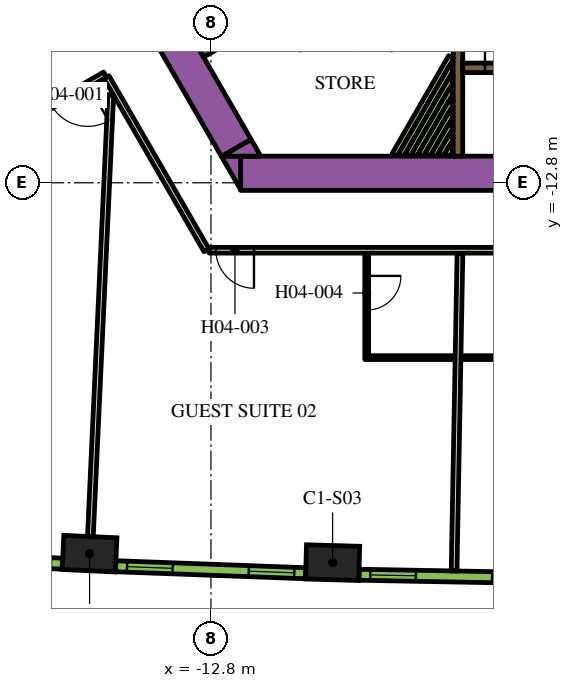
"""IFC4 building model, lengths in metres.
Left out: names, types, materials, properties, quantities, classifications, styles, units other than length and angle.
Written with IfcOpenShell. Run it as: python <this file> out.ifc"""

import sys

from ifc_helpers import new_model, si_unit, direction, frame, frame_2d, origin, origin_2d, place, context, subcontext, project, spatial, polyline, rectangle, outline, extrude, element, fill, save


model = new_model("IFC4")
c1 = context("Model", 3, precision=1e-05, world=origin(), true_north=direction((0.0, 1.0)))
c2 = subcontext(c1, "Body", "Model", "MODEL_VIEW")
j1 = project(units=[si_unit("LENGTHUNIT", "METRE"), si_unit("PLANEANGLEUNIT", "RADIAN")], contexts=[c1])
p1 = place(None, origin())
s1 = spatial("IfcSite", under=j1, at=p1, CompositionType="ELEMENT")
p2 = place(p1, origin())
s2 = spatial("IfcBuilding", under=s1, at=p2, CompositionType="ELEMENT")
p3 = place(p2, frame((0.0, 0.0, 70.5)))
s3 = spatial("IfcBuildingStorey", under=s2, at=p3, CompositionType="ELEMENT", Elevation=70.5)
for number, where, z_axis, x_axis in (
    (1, (-15.994, -22.558, 0.0), (0.0, 0.0, 1.0), (0.999, -0.046, 0.0)),
    (2, (-9.599, -22.795, 0.0), (0.0, 0.0, 1.0), (1.0, -0.028, 0.0)),
):
    element("IfcColumn", number, at=place(p3, frame(where, z_axis=z_axis, x_axis=x_axis)), inside=s3, PredefinedType="COLUMN", context=c2, shape_type="SweptSolid", body=[
        extrude(rectangle(XDim=1.4, YDim=0.9, at=origin_2d()), origin(), (0.0, 0.0, 1.0), 3.9),
    ])
p4 = place(p3, frame((-12.019, -12.55, 0.0), z_axis=(0.0, 0.0, 1.0), x_axis=(1.0, 0.0, 0.0)))
e3 = element("IfcWall", 3, at=p4, inside=s3, PredefinedType="SOLIDWALL", context=c2, shape_type="SweptSolid", body=[
    extrude(rectangle(XDim=21.63, YDim=0.9, at=frame_2d((10.815, 0.0))), origin(), (0.0, 0.0, 1.0), 3.9),
])
p5 = place(p3, origin())
e4 = element("IfcWall", 4, at=p5, inside=s3, PredefinedType="SOLIDWALL", context=c2, shape_type="SweptSolid", body=[
    extrude(outline(polyline([(-12.529, -12.1), (-12.021, -12.1), (-12.021, -12.98), (-12.529, -12.1)])), origin(), (0.0, 0.0, 1.0), 3.9),
])
p6 = place(p3, frame((-12.134, -11.883, 0.0), z_axis=(0.0, 0.0, 1.0), x_axis=(-0.500005339912, 0.866022320763, 0.0)))
e5 = element("IfcWall", 5, at=p6, inside=s3, PredefinedType="SOLIDWALL", context=c2, shape_type="SweptSolid", body=[
    extrude(rectangle(XDim=9.488, YDim=0.9, at=frame_2d((4.744, 0.0))), origin(), (0.0, 0.0, 1.0), 3.9),
])
e6 = element("IfcWall", 6, at=p5, inside=s3, PredefinedType="SOLIDWALL", context=c2, shape_type="SweptSolid", body=[
    extrude(outline(polyline([(-11.489, -12.1), (-12.505, -12.1), (-11.743, -11.66), (-11.489, -12.1)])), origin(), (0.0, 0.0, 1.0), 3.9),
])
p7 = place(p3, frame((-12.885, -9.431, 0.0), z_axis=(0.0, 0.0, 1.0), x_axis=(-0.500020560727, 0.866013532718, 0.0)))
e7 = element("IfcWall", 7, at=p7, inside=s3, PredefinedType="SOLIDWALL", context=c2, shape_type="SweptSolid", body=[
    extrude(rectangle(XDim=3.45, YDim=0.25, at=frame_2d((1.725, 0.0))), origin(), (0.0, 0.0, 1.0), 3.9),
])
p8 = place(p3, frame((-12.84, -9.261, 0.0), z_axis=(0.0, 0.0, 1.0), x_axis=(0.866016039709, 0.500016218704, 0.0)))
e8 = element("IfcWall", 8, at=p8, inside=s3, PredefinedType="SOLIDWALL", context=c2, shape_type="SweptSolid", body=[
    extrude(rectangle(XDim=7.05, YDim=0.25, at=frame_2d((3.525, 0.0))), origin(), (0.0, 0.0, 1.0), 3.9),
])
p9 = place(p3, frame((-6.3, -12.1, 0.0), z_axis=(0.0, 0.0, 1.0), x_axis=(0.0, 1.0, 0.0)))
e9 = element("IfcWall", 9, at=p9, inside=s3, PredefinedType="SOLIDWALL", context=c2, shape_type="SweptSolid", body=[
    extrude(rectangle(XDim=3.265, YDim=0.25, at=frame_2d((1.632, 0.0))), origin(), (0.0, 0.0, 1.0), 3.9),
])
p10 = place(p3, frame((-7.968, -12.068, 0.0), z_axis=(0.0, 0.0, 1.0), x_axis=(0.500013701029, 0.866017493347, 0.0)))
e10 = element("IfcWall", 10, at=p10, inside=s3, PredefinedType="PARTITIONING", context=c2, shape_type="SweptSolid", body=[
    extrude(rectangle(XDim=2.975, YDim=0.15, at=frame_2d((1.488, 0.0))), origin(), (0.0, 0.0, 1.0), 2.75),
])
p11 = place(p3, frame((-7.794, -12.068, 0.0), z_axis=(0.0, 0.0, 1.0), x_axis=(0.499985098601, 0.86603400694, 0.0)))
e11 = element("IfcWall", 11, at=p11, inside=s3, PredefinedType="PARTITIONING", context=c2, shape_type="SweptSolid", body=[
    extrude(rectangle(XDim=2.628, YDim=0.15, at=frame_2d((1.314, 0.0))), origin(), (0.0, 0.0, 1.0), 2.75),
])
p12 = place(p3, frame((-7.621, -12.068, 0.0), z_axis=(0.0, 0.0, 1.0), x_axis=(0.500028047758, 0.866009209798, 0.0)))
e12 = element("IfcWall", 12, at=p12, inside=s3, PredefinedType="PARTITIONING", context=c2, shape_type="SweptSolid", body=[
    extrude(rectangle(XDim=2.282, YDim=0.15, at=frame_2d((1.141, 0.0))), origin(), (0.0, 0.0, 1.0), 2.75),
])
p13 = place(p3, frame((-7.448, -12.068, 0.0), z_axis=(0.0, 0.0, 1.0), x_axis=(0.500031751504, 0.866007071269, 0.0)))
e13 = element("IfcWall", 13, at=p13, inside=s3, PredefinedType="PARTITIONING", context=c2, shape_type="SweptSolid", body=[
    extrude(rectangle(XDim=1.936, YDim=0.15, at=frame_2d((0.968, 0.0))), origin(), (0.0, 0.0, 1.0), 2.75),
])
p14 = place(p3, frame((-7.275, -12.068, 0.0), z_axis=(0.0, 0.0, 1.0), x_axis=(0.499988385283, 0.86603210944, 0.0)))
e14 = element("IfcWall", 14, at=p14, inside=s3, PredefinedType="PARTITIONING", context=c2, shape_type="SweptSolid", body=[
    extrude(rectangle(XDim=1.589, YDim=0.15, at=frame_2d((0.795, 0.0))), origin(), (0.0, 0.0, 1.0), 2.75),
])
p15 = place(p3, frame((-7.102, -12.068, 0.0), z_axis=(0.0, 0.0, 1.0), x_axis=(0.500068153333, 0.865986051864, 0.0)))
e15 = element("IfcWall", 15, at=p15, inside=s3, PredefinedType="PARTITIONING", context=c2, shape_type="SweptSolid", body=[
    extrude(rectangle(XDim=1.243, YDim=0.15, at=frame_2d((0.622, 0.0))), origin(), (0.0, 0.0, 1.0), 2.75),
])
p16 = place(p3, frame((-6.928, -12.068, 0.0), z_axis=(0.0, 0.0, 1.0), x_axis=(0.500005339912, 0.866022320763, 0.0)))
e16 = element("IfcWall", 16, at=p16, inside=s3, PredefinedType="PARTITIONING", context=c2, shape_type="SweptSolid", body=[
    extrude(rectangle(XDim=0.896, YDim=0.15, at=frame_2d((0.448, 0.0))), origin(), (0.0, 0.0, 1.0), 2.75),
])
p17 = place(p3, frame((-6.755, -12.068, 0.0), z_axis=(0.0, 0.0, 1.0), x_axis=(0.500196256984, 0.865912065108, 0.0)))
e17 = element("IfcWall", 17, at=p17, inside=s3, PredefinedType="PARTITIONING", context=c2, shape_type="SweptSolid", body=[
    extrude(rectangle(XDim=0.55, YDim=0.15, at=frame_2d((0.275, 0.0))), origin(), (0.0, 0.0, 1.0), 2.75),
])
p18 = place(p3, frame((-6.582, -12.068, 0.0), z_axis=(0.0, 0.0, 1.0), x_axis=(0.499618727529, 0.866245419672, 0.0)))
e18 = element("IfcWall", 18, at=p18, inside=s3, PredefinedType="PARTITIONING", context=c2, shape_type="SweptSolid", body=[
    extrude(rectangle(XDim=0.204, YDim=0.15, at=frame_2d((0.102, 0.0))), origin(), (0.0, 0.0, 1.0), 2.75),
])
p19 = place(p3, frame((-6.175, -9.775, 0.0), z_axis=(0.0, 0.0, 1.0), x_axis=(1.0, 0.0, 0.0)))
e19 = element("IfcWall", 19, at=p19, inside=s3, PredefinedType="SOLIDWALL", context=c2, shape_type="SweptSolid", body=[
    extrude(rectangle(XDim=12.35, YDim=0.25, at=frame_2d((6.175, 0.0))), origin(), (0.0, 0.0, 1.0), 3.9),
])
p20 = place(p19, frame((0.585, 0.0, 0.0)))
e20 = element("IfcOpeningElement", 20, at=p20, cuts=e19, PredefinedType="OPENING", context=c2, shape_type="SweptSolid", body=[
    extrude(rectangle(XDim=1.1, YDim=2.1, at=frame_2d((0.55, 1.05))), frame((0.0, 0.135, 0.0), z_axis=(0.0, -1.0, 0.0), x_axis=(1.0, 0.0, 0.0)), (0.0, 0.0, 1.0), 0.27),
])
p21 = place(p19, frame((3.105, 0.0, 0.0)))
e21 = element("IfcOpeningElement", 21, at=p21, cuts=e19, PredefinedType="OPENING", context=c2, shape_type="SweptSolid", body=[
    extrude(rectangle(XDim=1.1, YDim=2.1, at=frame_2d((0.55, 1.05))), frame((0.0, 0.135, 0.0), z_axis=(0.0, -1.0, 0.0), x_axis=(1.0, 0.0, 0.0)), (0.0, 0.0, 1.0), 0.27),
])
p22 = place(p19, frame((5.625, 0.0, 0.0)))
e22 = element("IfcOpeningElement", 22, at=p22, cuts=e19, PredefinedType="OPENING", context=c2, shape_type="SweptSolid", body=[
    extrude(rectangle(XDim=1.1, YDim=2.1, at=frame_2d((0.55, 1.05))), frame((0.0, 0.135, 0.0), z_axis=(0.0, -1.0, 0.0), x_axis=(1.0, 0.0, 0.0)), (0.0, 0.0, 1.0), 0.27),
])
p23 = place(p19, frame((8.145, 0.0, 0.0)))
e23 = element("IfcOpeningElement", 23, at=p23, cuts=e19, PredefinedType="OPENING", context=c2, shape_type="SweptSolid", body=[
    extrude(rectangle(XDim=1.1, YDim=2.1, at=frame_2d((0.55, 1.05))), frame((0.0, 0.135, 0.0), z_axis=(0.0, -1.0, 0.0), x_axis=(1.0, 0.0, 0.0)), (0.0, 0.0, 1.0), 0.27),
])
p24 = place(p19, frame((10.665, 0.0, 0.0)))
e24 = element("IfcOpeningElement", 24, at=p24, cuts=e19, PredefinedType="OPENING", context=c2, shape_type="SweptSolid", body=[
    extrude(rectangle(XDim=1.1, YDim=2.1, at=frame_2d((0.55, 1.05))), frame((0.0, 0.135, 0.0), z_axis=(0.0, -1.0, 0.0), x_axis=(1.0, 0.0, 0.0)), (0.0, 0.0, 1.0), 0.27),
])
p25 = place(p3, frame((-30.463, -16.635, 0.0), z_axis=(0.0, 0.0, 1.0), x_axis=(0.866022394896, 0.500005211512, 0.0)))
e25 = element("IfcWall", 25, at=p25, inside=s3, PredefinedType="PARTITIONING", context=c2, shape_type="SweptSolid", body=[
    extrude(rectangle(XDim=16.144, YDim=0.15, at=frame_2d((8.072, 0.0))), origin(), (0.0, 0.0, 1.0), 2.75),
])
p26 = place(p25, frame((11.004, 0.0, 0.0)))
e26 = element("IfcOpeningElement", 26, at=p26, cuts=e25, PredefinedType="OPENING", context=c2, shape_type="SweptSolid", body=[
    extrude(rectangle(XDim=1.0, YDim=2.1, at=frame_2d((0.5, 1.05))), frame((0.0, 0.085, 0.0), z_axis=(0.0, -1.0, 0.0), x_axis=(1.0, 0.0, 0.0)), (0.0, 0.0, 1.0), 0.17),
])
p27 = place(p3, frame((-15.587, -9.952, 0.0), z_axis=(0.0, 0.0, 1.0), x_axis=(-0.866022197818, -0.500005552856, 0.0)))
e27 = element("IfcWall", 27, at=p27, inside=s3, PredefinedType="PARTITIONING", context=c2, shape_type="SweptSolid", body=[
    extrude(rectangle(XDim=16.224, YDim=0.15, at=frame_2d((8.112, 0.0))), origin(), (0.0, 0.0, 1.0), 2.75),
])
p28 = place(p27, frame((0.527, 0.0, 0.0)))
e28 = element("IfcOpeningElement", 28, at=p28, cuts=e27, PredefinedType="OPENING", context=c2, shape_type="SweptSolid", body=[
    extrude(rectangle(XDim=1.1, YDim=2.1, at=frame_2d((0.55, 1.05))), frame((0.0, 0.085, 0.0), z_axis=(0.0, -1.0, 0.0), x_axis=(1.0, 0.0, 0.0)), (0.0, 0.0, 1.0), 0.17),
])
p29 = place(p3, frame((-12.918, -14.575, 0.0), z_axis=(0.0, 0.0, 1.0), x_axis=(-0.500009150678, 0.866020120573, 0.0)))
e29 = element("IfcWall", 29, at=p29, inside=s3, PredefinedType="PARTITIONING", context=c2, shape_type="SweptSolid", body=[
    extrude(rectangle(XDim=5.258, YDim=0.15, at=frame_2d((2.629, 0.0))), origin(), (0.0, 0.0, 1.0), 2.75),
])
p30 = place(p3, frame((12.918, -14.575, 0.0), z_axis=(0.0, 0.0, 1.0), x_axis=(-1.0, 0.0, 0.0)))
e30 = element("IfcWall", 30, at=p30, inside=s3, PredefinedType="PARTITIONING", context=c2, shape_type="SweptSolid", body=[
    extrude(rectangle(XDim=25.766, YDim=0.15, at=frame_2d((12.883, 0.0))), origin(), (0.0, 0.0, 1.0), 2.75),
])
p31 = place(p30, frame((24.586, 0.0, 0.0)))
e31 = element("IfcOpeningElement", 31, at=p31, cuts=e30, PredefinedType="OPENING", context=c2, shape_type="SweptSolid", body=[
    extrude(rectangle(XDim=1.0, YDim=2.1, at=frame_2d((0.5, 1.05))), frame((0.0, 0.085, 0.0), z_axis=(0.0, -1.0, 0.0), x_axis=(1.0, 0.0, 0.0)), (0.0, 0.0, 1.0), 0.17),
])
p32 = place(p30, frame((9.948, 0.0, 0.0)))
e32 = element("IfcOpeningElement", 32, at=p32, cuts=e30, PredefinedType="OPENING", context=c2, shape_type="SweptSolid", body=[
    extrude(rectangle(XDim=1.0, YDim=2.1, at=frame_2d((0.5, 1.05))), frame((0.0, 0.085, 0.0), z_axis=(0.0, -1.0, 0.0), x_axis=(1.0, 0.0, 0.0)), (0.0, 0.0, 1.0), 0.17),
])
p33 = place(p30, frame((8.642, 0.0, 0.0)))
e33 = element("IfcOpeningElement", 33, at=p33, cuts=e30, PredefinedType="OPENING", context=c2, shape_type="SweptSolid", body=[
    extrude(rectangle(XDim=1.0, YDim=2.1, at=frame_2d((0.5, 1.05))), frame((0.0, 0.085, 0.0), z_axis=(0.0, -1.0, 0.0), x_axis=(1.0, 0.0, 0.0)), (0.0, 0.0, 1.0), 0.17),
])
p34 = place(p30, frame((0.18, 0.0, 0.0)))
e34 = element("IfcOpeningElement", 34, at=p34, cuts=e30, PredefinedType="OPENING", context=c2, shape_type="SweptSolid", body=[
    extrude(rectangle(XDim=1.0, YDim=2.1, at=frame_2d((0.5, 1.05))), frame((0.0, 0.085, 0.0), z_axis=(0.0, -1.0, 0.0), x_axis=(1.0, 0.0, 0.0)), (0.0, 0.0, 1.0), 0.17),
])
p35 = place(p3, frame((-15.973, -22.109, 0.0), z_axis=(0.0, 0.0, 1.0), x_axis=(0.046191717129, 0.998932592955, 0.0)))
e35 = element("IfcWall", 35, at=p35, inside=s3, PredefinedType="PARTITIONING", context=c2, shape_type="SweptSolid", body=[
    extrude(rectangle(XDim=11.638, YDim=0.15, at=frame_2d((5.819, 0.0))), origin(), (0.0, 0.0, 1.0), 2.75),
])
p36 = place(p3, frame((-6.402, -23.014, 0.0), z_axis=(0.0, 0.0, 1.0), x_axis=(0.01849587109, 0.999828936745, 0.0)))
e36 = element("IfcWall", 36, at=p36, inside=s3, PredefinedType="PARTITIONING", context=c2, shape_type="SweptSolid", body=[
    extrude(rectangle(XDim=8.355, YDim=0.15, at=frame_2d((4.178, 0.0))), origin(), (0.0, 0.0, 1.0), 2.75),
])
p37 = place(p3, frame((-8.702, -14.65, 0.0), z_axis=(0.0, 0.0, 1.0), x_axis=(0.0, -1.0, 0.0)))
e37 = element("IfcWall", 37, at=p37, inside=s3, PredefinedType="PARTITIONING", context=c2, shape_type="SweptSolid", body=[
    extrude(rectangle(XDim=2.8, YDim=0.1, at=frame_2d((1.4, 0.0))), origin(), (0.0, 0.0, 1.0), 2.75),
])
p38 = place(p37, frame((0.6, 0.0, 0.0)))
e38 = element("IfcOpeningElement", 38, at=p38, cuts=e37, PredefinedType="OPENING", context=c2, shape_type="SweptSolid", body=[
    extrude(rectangle(XDim=0.9, YDim=2.1, at=frame_2d((0.45, 1.05))), frame((0.0, 0.06, 0.0), z_axis=(0.0, -1.0, 0.0), x_axis=(1.0, 0.0, 0.0)), (0.0, 0.0, 1.0), 0.12),
])
p39 = place(p3, frame((-8.652, -17.4, 0.0), z_axis=(0.0, 0.0, 1.0), x_axis=(1.0, 0.0, 0.0)))
e39 = element("IfcWall", 39, at=p39, inside=s3, PredefinedType="PARTITIONING", context=c2, shape_type="SweptSolid", body=[
    extrude(rectangle(XDim=2.27, YDim=0.1, at=frame_2d((1.135, 0.0))), origin(), (0.0, 0.0, 1.0), 2.75),
])
p40 = place(p3, frame((-3.844, -17.4, 0.0), z_axis=(0.0, 0.0, 1.0), x_axis=(-1.0, 0.0, 0.0)))
e40 = element("IfcWall", 40, at=p40, inside=s3, PredefinedType="PARTITIONING", context=c2, shape_type="SweptSolid", body=[
    extrude(rectangle(XDim=2.37, YDim=0.1, at=frame_2d((1.185, 0.0))), origin(), (0.0, 0.0, 1.0), 2.75),
])
p41 = place(p3, frame((-21.701, -22.547, 0.0), z_axis=(0.0, 0.0, 1.0), x_axis=(0.998464708705, -0.055391564976, 0.0)))
e41 = element("IfcWall", 41, at=p41, inside=s3, PredefinedType="SOLIDWALL", context=c2, shape_type="SweptSolid", body=[
    extrude(rectangle(XDim=4.998, YDim=0.29, at=frame_2d((2.499, 0.0))), origin(), (0.0, 0.0, 1.0), 3.65),
])
p42 = place(p41, frame((0.297, 0.0, 0.9)))
e42 = element("IfcOpeningElement", 42, at=p42, cuts=e41, PredefinedType="OPENING", context=c2, shape_type="SweptSolid", body=[
    extrude(rectangle(XDim=1.2, YDim=2.15, at=frame_2d((0.6, 1.075))), frame((0.0, 0.155, 0.0), z_axis=(0.0, -1.0, 0.0), x_axis=(1.0, 0.0, 0.0)), (0.0, 0.0, 1.0), 0.31),
])
p43 = place(p41, frame((3.501, 0.0, 0.9)))
e43 = element("IfcOpeningElement", 43, at=p43, cuts=e41, PredefinedType="OPENING", context=c2, shape_type="SweptSolid", body=[
    extrude(rectangle(XDim=1.2, YDim=2.15, at=frame_2d((0.6, 1.075))), frame((0.0, 0.155, 0.0), z_axis=(0.0, -1.0, 0.0), x_axis=(1.0, 0.0, 0.0)), (0.0, 0.0, 1.0), 0.31),
])
p44 = place(p3, frame((-15.305, -22.889, 0.0), z_axis=(0.0, 0.0, 1.0), x_axis=(0.999317974969, -0.036926750529, 0.0)))
e44 = element("IfcWall", 44, at=p44, inside=s3, PredefinedType="SOLIDWALL", context=c2, shape_type="SweptSolid", body=[
    extrude(rectangle(XDim=4.998, YDim=0.29, at=frame_2d((2.499, 0.0))), origin(), (0.0, 0.0, 1.0), 3.65),
])
p45 = place(p44, frame((0.297, 0.0, 0.9)))
e45 = element("IfcOpeningElement", 45, at=p45, cuts=e44, PredefinedType="OPENING", context=c2, shape_type="SweptSolid", body=[
    extrude(rectangle(XDim=1.2, YDim=2.15, at=frame_2d((0.6, 1.075))), frame((0.0, 0.155, 0.0), z_axis=(0.0, -1.0, 0.0), x_axis=(1.0, 0.0, 0.0)), (0.0, 0.0, 1.0), 0.31),
])
p46 = place(p44, frame((3.501, 0.0, 0.9)))
e46 = element("IfcOpeningElement", 46, at=p46, cuts=e44, PredefinedType="OPENING", context=c2, shape_type="SweptSolid", body=[
    extrude(rectangle(XDim=1.2, YDim=2.15, at=frame_2d((0.6, 1.075))), frame((0.0, 0.155, 0.0), z_axis=(0.0, -1.0, 0.0), x_axis=(1.0, 0.0, 0.0)), (0.0, 0.0, 1.0), 0.31),
])
p47 = place(p3, frame((-8.904, -23.113, 0.0), z_axis=(0.0, 0.0, 1.0), x_axis=(0.999829529479, -0.018463801951, 0.0)))
e47 = element("IfcWall", 47, at=p47, inside=s3, PredefinedType="SOLIDWALL", context=c2, shape_type="SweptSolid", body=[
    extrude(rectangle(XDim=4.998, YDim=0.29, at=frame_2d((2.499, 0.0))), origin(), (0.0, 0.0, 1.0), 3.65),
])
p48 = place(p47, frame((0.297, 0.0, 0.9)))
e48 = element("IfcOpeningElement", 48, at=p48, cuts=e47, PredefinedType="OPENING", context=c2, shape_type="SweptSolid", body=[
    extrude(rectangle(XDim=1.2, YDim=2.15, at=frame_2d((0.6, 1.075))), frame((0.0, 0.155, 0.0), z_axis=(0.0, -1.0, 0.0), x_axis=(1.0, 0.0, 0.0)), (0.0, 0.0, 1.0), 0.31),
])
p49 = place(p47, frame((3.501, 0.0, 0.9)))
e49 = element("IfcOpeningElement", 49, at=p49, cuts=e47, PredefinedType="OPENING", context=c2, shape_type="SweptSolid", body=[
    extrude(rectangle(XDim=1.2, YDim=2.15, at=frame_2d((0.6, 1.075))), frame((0.0, 0.155, 0.0), z_axis=(0.0, -1.0, 0.0), x_axis=(1.0, 0.0, 0.0)), (0.0, 0.0, 1.0), 0.31),
])
p50 = place(p20, origin())
e50 = element("IfcDoor", 50, at=p50, inside=s3, OperationType="DOUBLE_DOOR_SLIDING", PredefinedType="DOOR", context=c2, shape_type="SweptSolid", body=[
    extrude(rectangle(XDim=1.1, YDim=2.1, at=frame_2d((0.55, 1.05))), frame((0.0, 0.025, 0.0), z_axis=(0.0, -1.0, 0.0), x_axis=(1.0, 0.0, 0.0)), (0.0, 0.0, 1.0), 0.05),
])
fill(e20, e50)
p51 = place(p28, origin())
e51 = element("IfcDoor", 51, at=p51, inside=s3, OperationType="SINGLE_SWING_LEFT", PredefinedType="DOOR", context=c2, shape_type="SweptSolid", body=[
    extrude(rectangle(XDim=1.1, YDim=2.1, at=frame_2d((0.55, 1.05))), frame((0.0, 0.025, 0.0), z_axis=(0.0, -1.0, 0.0), x_axis=(1.0, 0.0, 0.0)), (0.0, 0.0, 1.0), 0.05),
])
fill(e28, e51)
p52 = place(p31, origin())
e52 = element("IfcDoor", 52, at=p52, inside=s3, OperationType="SINGLE_SWING_RIGHT", PredefinedType="DOOR", context=c2, shape_type="SweptSolid", body=[
    extrude(rectangle(XDim=1.0, YDim=2.1, at=frame_2d((0.5, 1.05))), frame((0.0, 0.025, 0.0), z_axis=(0.0, -1.0, 0.0), x_axis=(1.0, 0.0, 0.0)), (0.0, 0.0, 1.0), 0.05),
])
fill(e31, e52)
p53 = place(p38, origin())
e53 = element("IfcDoor", 53, at=p53, inside=s3, OperationType="SINGLE_SWING_LEFT", PredefinedType="DOOR", context=c2, shape_type="SweptSolid", body=[
    extrude(rectangle(XDim=0.9, YDim=2.1, at=frame_2d((0.45, 1.05))), frame((0.0, 0.025, 0.0), z_axis=(0.0, -1.0, 0.0), x_axis=(1.0, 0.0, 0.0)), (0.0, 0.0, 1.0), 0.05),
])
fill(e38, e53)
p54 = place(p45, origin())
e54 = element("IfcWindow", 54, at=p54, inside=s3, PartitioningType="DOUBLE_PANEL_VERTICAL", PredefinedType="WINDOW", context=c2, shape_type="SweptSolid", body=[
    extrude(rectangle(XDim=1.2, YDim=2.15, at=frame_2d((0.6, 1.075))), frame((0.0, 0.015, 0.0), z_axis=(0.0, -1.0, 0.0), x_axis=(1.0, 0.0, 0.0)), (0.0, 0.0, 1.0), 0.06),
])
fill(e45, e54)
p55 = place(p46, origin())
e55 = element("IfcWindow", 55, at=p55, inside=s3, PartitioningType="DOUBLE_PANEL_VERTICAL", PredefinedType="WINDOW", context=c2, shape_type="SweptSolid", body=[
    extrude(rectangle(XDim=1.2, YDim=2.15, at=frame_2d((0.6, 1.075))), frame((0.0, 0.015, 0.0), z_axis=(0.0, -1.0, 0.0), x_axis=(1.0, 0.0, 0.0)), (0.0, 0.0, 1.0), 0.06),
])
fill(e46, e55)
p56 = place(p48, origin())
e56 = element("IfcWindow", 56, at=p56, inside=s3, PartitioningType="DOUBLE_PANEL_VERTICAL", PredefinedType="WINDOW", context=c2, shape_type="SweptSolid", body=[
    extrude(rectangle(XDim=1.2, YDim=2.15, at=frame_2d((0.6, 1.075))), frame((0.0, 0.015, 0.0), z_axis=(0.0, -1.0, 0.0), x_axis=(1.0, 0.0, 0.0)), (0.0, 0.0, 1.0), 0.06),
])
fill(e48, e56)
p57 = place(p49, origin())
e57 = element("IfcWindow", 57, at=p57, inside=s3, PartitioningType="DOUBLE_PANEL_VERTICAL", PredefinedType="WINDOW", context=c2, shape_type="SweptSolid", body=[
    extrude(rectangle(XDim=1.2, YDim=2.15, at=frame_2d((0.6, 1.075))), frame((0.0, 0.015, 0.0), z_axis=(0.0, -1.0, 0.0), x_axis=(1.0, 0.0, 0.0)), (0.0, 0.0, 1.0), 0.06),
])
fill(e49, e57)
save(model, sys.argv[1])
